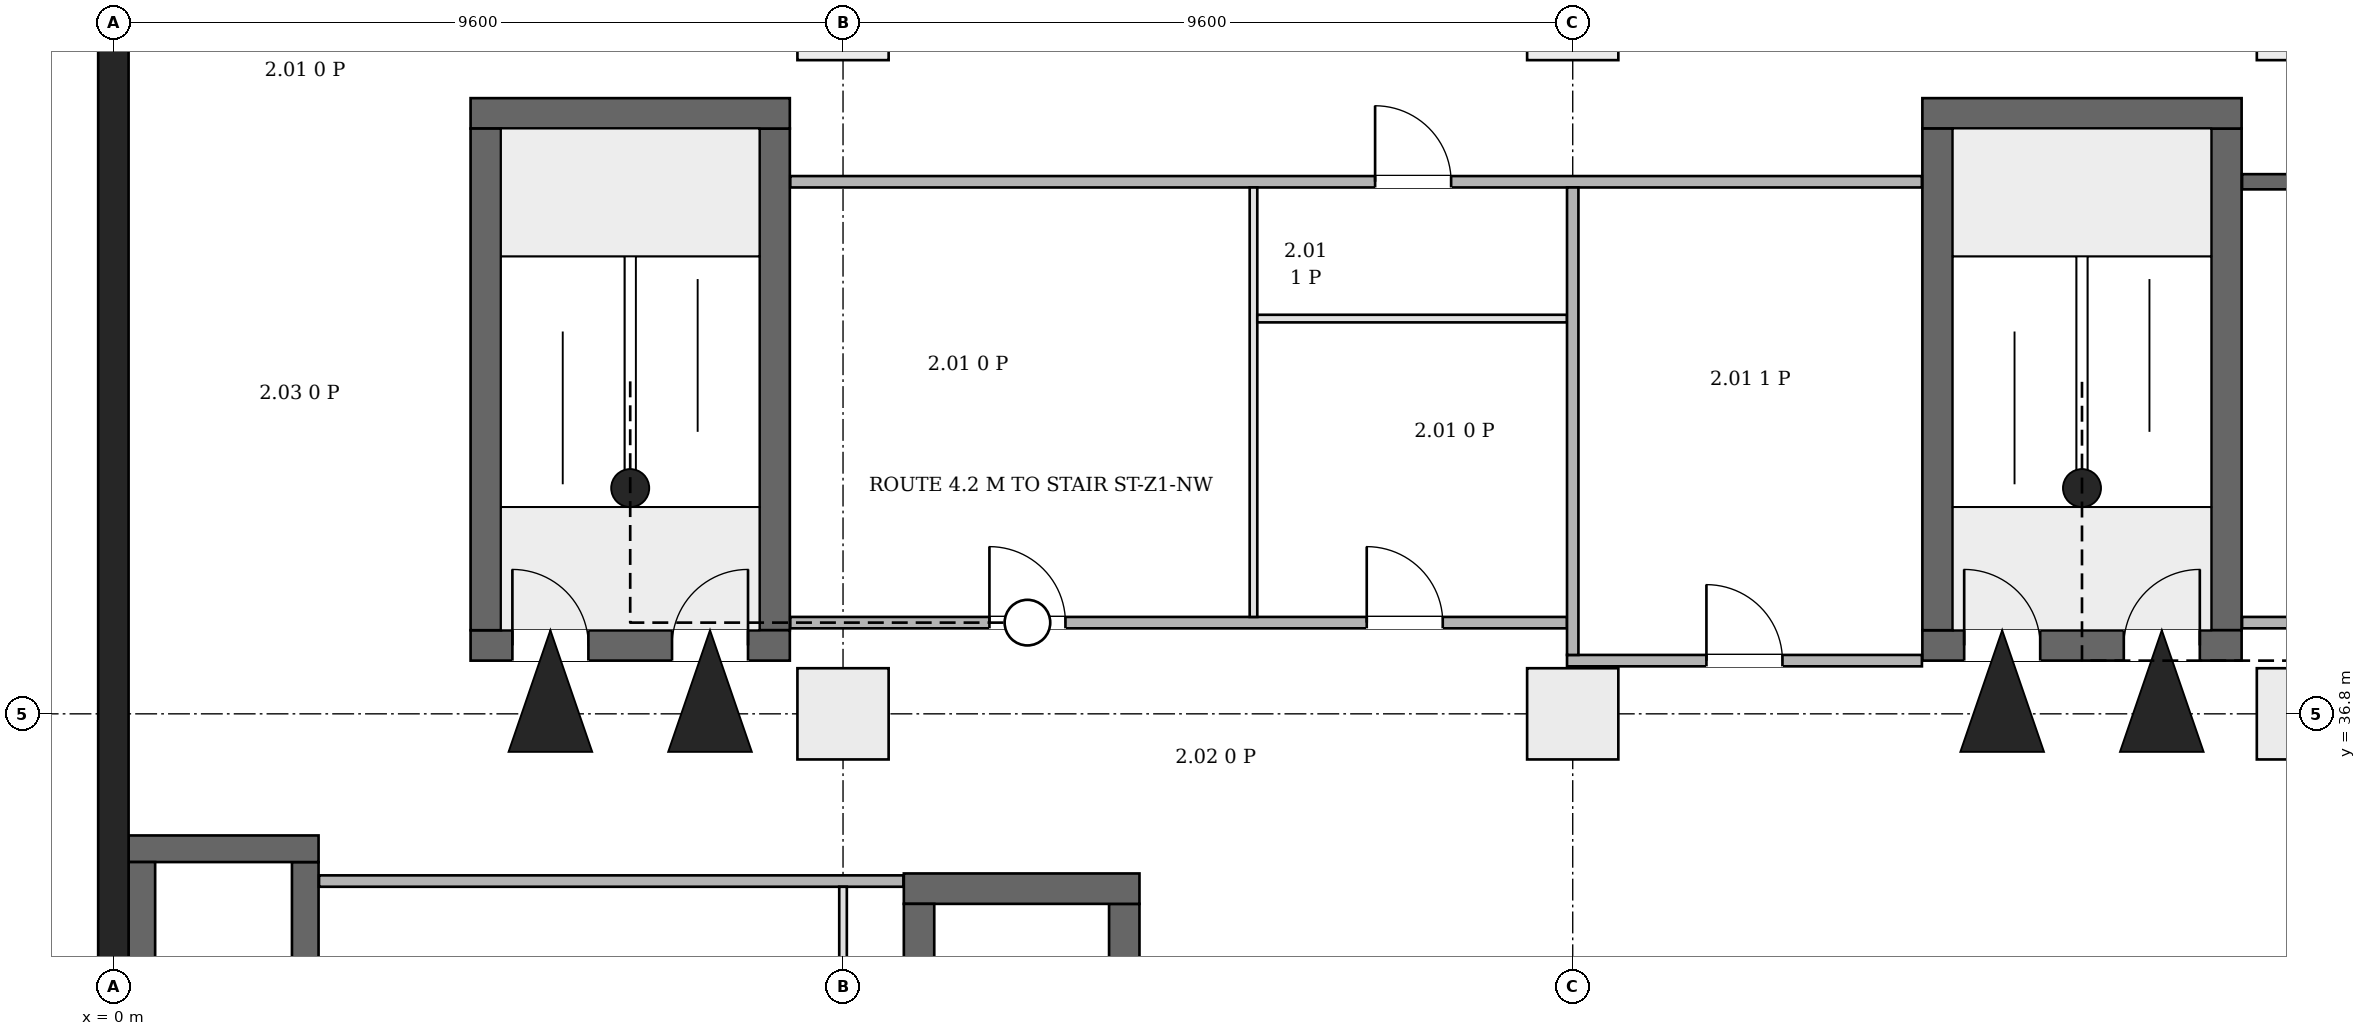
"""IFC4 building model, lengths in metres.
Left out: names, types, materials, properties, quantities, classifications, styles, units other than length and angle.
Written with IfcOpenShell. Run it as: python <this file> out.ifc"""

import sys

from ifc_helpers import new_model, si_unit, direction, frame, frame_2d, origin, origin_2d, place, context, subcontext, project, spatial, rectangle, extrude, element, fill, save


model = new_model("IFC4")
c1 = context("Model", 3, precision=1e-05, world=origin(), true_north=direction((0.0, 1.0)))
c2 = subcontext(c1, "Body", "Model", "MODEL_VIEW")
j1 = project(units=[si_unit("LENGTHUNIT", "METRE"), si_unit("PLANEANGLEUNIT", "RADIAN")], contexts=[c1])
p1 = place(None, origin())
s1 = spatial("IfcSite", under=j1, at=p1, CompositionType="ELEMENT")
p2 = place(p1, origin())
s2 = spatial("IfcBuilding", under=s1, at=p2, CompositionType="ELEMENT")
p3 = place(p2, frame((0.0, 0.0, 14.2)))
s3 = spatial("IfcBuildingStorey", under=s2, at=p3, CompositionType="ELEMENT", Elevation=14.2)
p4 = place(p3, frame((0.0, -0.2, 0.0), z_axis=(0.0, 0.0, 1.0), x_axis=(0.0, 1.0, 0.0)))
e1 = element("IfcWall", 1, at=p4, inside=s3, PredefinedType="SHEAR", context=c2, shape_type="SweptSolid", body=[
    extrude(rectangle(XDim=46.88, YDim=0.4, at=frame_2d((23.44, 0.0))), origin(), (0.0, 0.0, 1.0), 7.5),
])
p5 = place(p3, frame((4.7, 37.7, 0.0), z_axis=(0.0, 0.0, 1.0), x_axis=(1.0, 0.0, 0.0)))
e2 = element("IfcWall", 2, at=p5, inside=s3, PredefinedType="SHEAR", context=c2, shape_type="SweptSolid", body=[
    extrude(rectangle(XDim=4.2, YDim=0.4, at=frame_2d((2.1, 0.0))), origin(), (0.0, 0.0, 1.0), 7.5),
])
p6 = place(p5, frame((0.55, 0.0, 0.0)))
e3 = element("IfcOpeningElement", 3, at=p6, cuts=e2, PredefinedType="OPENING", context=c2, shape_type="SweptSolid", body=[
    extrude(rectangle(XDim=1.0, YDim=2.1, at=frame_2d((0.5, 1.05))), frame((0.0, 0.21, 0.0), z_axis=(0.0, -1.0, 0.0), x_axis=(1.0, 0.0, 0.0)), (0.0, 0.0, 1.0), 0.42),
])
p7 = place(p5, frame((2.65, 0.0, 0.0)))
e4 = element("IfcOpeningElement", 4, at=p7, cuts=e2, PredefinedType="OPENING", context=c2, shape_type="SweptSolid", body=[
    extrude(rectangle(XDim=1.0, YDim=2.1, at=frame_2d((0.5, 1.05))), frame((0.0, 0.21, 0.0), z_axis=(0.0, -1.0, 0.0), x_axis=(1.0, 0.0, 0.0)), (0.0, 0.0, 1.0), 0.42),
])
p8 = place(p3, frame((4.7, 44.7, 0.0), z_axis=(0.0, 0.0, 1.0), x_axis=(1.0, 0.0, 0.0)))
e5 = element("IfcWall", 5, at=p8, inside=s3, PredefinedType="SHEAR", context=c2, shape_type="SweptSolid", body=[
    extrude(rectangle(XDim=4.2, YDim=0.4, at=frame_2d((2.1, 0.0))), origin(), (0.0, 0.0, 1.0), 7.5),
])
for number, where, z_axis, x_axis in (
    (6, (4.9, 37.9, 0.0), (0.0, 0.0, 1.0), (0.0, 1.0, 0.0)),
    (7, (8.7, 37.9, 0.0), (0.0, 0.0, 1.0), (0.0, 1.0, 0.0)),
):
    element("IfcWall", number, at=place(p3, frame(where, z_axis=z_axis, x_axis=x_axis)), inside=s3, PredefinedType="SHEAR", context=c2, shape_type="SweptSolid", body=[
        extrude(rectangle(XDim=6.6, YDim=0.4, at=frame_2d((3.3, 0.0))), origin(), (0.0, 0.0, 1.0), 7.5),
    ])
p9 = place(p3, frame((23.8, 37.7, 0.0), z_axis=(0.0, 0.0, 1.0), x_axis=(1.0, 0.0, 0.0)))
e8 = element("IfcWall", 8, at=p9, inside=s3, PredefinedType="SHEAR", context=c2, shape_type="SweptSolid", body=[
    extrude(rectangle(XDim=4.2, YDim=0.4, at=frame_2d((2.1, 0.0))), origin(), (0.0, 0.0, 1.0), 7.5),
])
p10 = place(p9, frame((0.55, 0.0, 0.0)))
e9 = element("IfcOpeningElement", 9, at=p10, cuts=e8, PredefinedType="OPENING", context=c2, shape_type="SweptSolid", body=[
    extrude(rectangle(XDim=1.0, YDim=2.1, at=frame_2d((0.5, 1.05))), frame((0.0, 0.21, 0.0), z_axis=(0.0, -1.0, 0.0), x_axis=(1.0, 0.0, 0.0)), (0.0, 0.0, 1.0), 0.42),
])
p11 = place(p9, frame((2.65, 0.0, 0.0)))
e10 = element("IfcOpeningElement", 10, at=p11, cuts=e8, PredefinedType="OPENING", context=c2, shape_type="SweptSolid", body=[
    extrude(rectangle(XDim=1.0, YDim=2.1, at=frame_2d((0.5, 1.05))), frame((0.0, 0.21, 0.0), z_axis=(0.0, -1.0, 0.0), x_axis=(1.0, 0.0, 0.0)), (0.0, 0.0, 1.0), 0.42),
])
p12 = place(p3, frame((23.8, 44.7, 0.0), z_axis=(0.0, 0.0, 1.0), x_axis=(1.0, 0.0, 0.0)))
e11 = element("IfcWall", 11, at=p12, inside=s3, PredefinedType="SHEAR", context=c2, shape_type="SweptSolid", body=[
    extrude(rectangle(XDim=4.2, YDim=0.4, at=frame_2d((2.1, 0.0))), origin(), (0.0, 0.0, 1.0), 7.5),
])
for number, where, z_axis, x_axis in (
    (12, (24.0, 37.9, 0.0), (0.0, 0.0, 1.0), (0.0, 1.0, 0.0)),
    (13, (27.8, 37.9, 0.0), (0.0, 0.0, 1.0), (0.0, 1.0, 0.0)),
):
    element("IfcWall", number, at=place(p3, frame(where, z_axis=z_axis, x_axis=x_axis)), inside=s3, PredefinedType="SHEAR", context=c2, shape_type="SweptSolid", body=[
        extrude(rectangle(XDim=6.6, YDim=0.4, at=frame_2d((3.3, 0.0))), origin(), (0.0, 0.0, 1.0), 7.5),
    ])
p13 = place(p3, frame((0.2, 35.025, 0.0), z_axis=(0.0, 0.0, 1.0), x_axis=(1.0, 0.0, 0.0)))
e14 = element("IfcWall", 14, at=p13, inside=s3, PredefinedType="SHEAR", context=c2, shape_type="SweptSolid", body=[
    extrude(rectangle(XDim=2.5, YDim=0.35, at=frame_2d((1.25, 0.0))), origin(), (0.0, 0.0, 1.0), 7.5),
])
for number, where, z_axis, x_axis in (
    (15, (0.375, 31.35, 0.0), (0.0, 0.0, 1.0), (0.0, 1.0, 0.0)),
    (16, (2.525, 31.35, 0.0), (0.0, 0.0, 1.0), (0.0, 1.0, 0.0)),
):
    element("IfcWall", number, at=place(p3, frame(where, z_axis=z_axis, x_axis=x_axis)), inside=s3, PredefinedType="SHEAR", context=c2, shape_type="SweptSolid", body=[
        extrude(rectangle(XDim=3.5, YDim=0.35, at=frame_2d((1.75, 0.0))), origin(), (0.0, 0.0, 1.0), 7.5),
    ])
p14 = place(p3, frame((10.4, 34.5, 0.0), z_axis=(0.0, 0.0, 1.0), x_axis=(1.0, 0.0, 0.0)))
e17 = element("IfcWall", 17, at=p14, inside=s3, PredefinedType="SHEAR", context=c2, shape_type="SweptSolid", body=[
    extrude(rectangle(XDim=3.1, YDim=0.4, at=frame_2d((1.55, 0.0))), origin(), (0.0, 0.0, 1.0), 7.5),
])
for number, where, z_axis, x_axis in (
    (18, (10.6, 30.9, 0.0), (0.0, 0.0, 1.0), (0.0, 1.0, 0.0)),
    (19, (13.3, 30.9, 0.0), (0.0, 0.0, 1.0), (0.0, 1.0, 0.0)),
):
    element("IfcWall", number, at=place(p3, frame(where, z_axis=z_axis, x_axis=x_axis)), inside=s3, PredefinedType="SHEAR", context=c2, shape_type="SweptSolid", body=[
        extrude(rectangle(XDim=3.4, YDim=0.4, at=frame_2d((1.7, 0.0))), origin(), (0.0, 0.0, 1.0), 7.5),
    ])
for number, where, z_axis, x_axis in (
    (20, (9.6, 36.8, 0.0), (0.0, 0.0, 1.0), (1.0, 0.0, 0.0)),
    (21, (19.2, 36.8, 0.0), (0.0, 0.0, 1.0), (1.0, 0.0, 0.0)),
    (22, (28.8, 36.8, 0.0), (0.0, 0.0, 1.0), (1.0, 0.0, 0.0)),
    (23, (9.6, 46.0, 0.0), (0.0, 0.0, 1.0), (1.0, 0.0, 0.0)),
    (24, (19.2, 46.0, 0.0), (0.0, 0.0, 1.0), (1.0, 0.0, 0.0)),
    (25, (28.8, 46.0, 0.0), (0.0, 0.0, 1.0), (1.0, 0.0, 0.0)),
):
    element("IfcColumn", number, at=place(p3, frame(where, z_axis=z_axis, x_axis=x_axis)), inside=s3, PredefinedType="COLUMN", context=c2, shape_type="SweptSolid", body=[
        extrude(rectangle(XDim=1.2, YDim=1.2, at=origin_2d()), origin(), (0.0, 0.0, 1.0), 7.5),
    ])
p15 = place(p3, frame((2.706, 34.6, 0.0), z_axis=(0.0, 0.0, 1.0), x_axis=(1.0, 0.0, 0.0)))
e26 = element("IfcWall", 26, at=p15, inside=s3, PredefinedType="PARTITIONING", context=c2, shape_type="SweptSolid", body=[
    extrude(rectangle(XDim=7.688, YDim=0.15, at=frame_2d((3.844, 0.0))), origin(), (0.0, 0.0, 1.0), 7.15),
])
p16 = place(p3, frame((8.906, 38.0, 0.0), z_axis=(0.0, 0.0, 1.0), x_axis=(1.0, 0.0, 0.0)))
e27 = element("IfcWall", 27, at=p16, inside=s3, PredefinedType="PARTITIONING", context=c2, shape_type="SweptSolid", body=[
    extrude(rectangle(XDim=10.219, YDim=0.15, at=frame_2d((5.109, 0.0))), origin(), (0.0, 0.0, 1.0), 7.15),
])
p17 = place(p16, frame((2.62, 0.0, 0.0)))
e28 = element("IfcOpeningElement", 28, at=p17, cuts=e27, PredefinedType="OPENING", context=c2, shape_type="SweptSolid", body=[
    extrude(rectangle(XDim=1.0, YDim=2.1, at=frame_2d((0.5, 1.05))), frame((0.0, 0.085, 0.0), z_axis=(0.0, -1.0, 0.0), x_axis=(1.0, 0.0, 0.0)), (0.0, 0.0, 1.0), 0.17),
])
p18 = place(p16, frame((7.584, 0.0, 0.0)))
e29 = element("IfcOpeningElement", 29, at=p18, cuts=e27, PredefinedType="OPENING", context=c2, shape_type="SweptSolid", body=[
    extrude(rectangle(XDim=1.0, YDim=2.1, at=frame_2d((0.5, 1.05))), frame((0.0, 0.085, 0.0), z_axis=(0.0, -1.0, 0.0), x_axis=(1.0, 0.0, 0.0)), (0.0, 0.0, 1.0), 0.17),
])
p19 = place(p3, frame((8.906, 43.8, 0.0), z_axis=(0.0, 0.0, 1.0), x_axis=(1.0, 0.0, 0.0)))
e30 = element("IfcWall", 30, at=p19, inside=s3, PredefinedType="PARTITIONING", context=c2, shape_type="SweptSolid", body=[
    extrude(rectangle(XDim=14.888, YDim=0.15, at=frame_2d((7.444, 0.0))), origin(), (0.0, 0.0, 1.0), 7.15),
])
p20 = place(p19, frame((7.694, 0.0, 0.0)))
e31 = element("IfcOpeningElement", 31, at=p20, cuts=e30, PredefinedType="OPENING", context=c2, shape_type="SweptSolid", body=[
    extrude(rectangle(XDim=1.0, YDim=2.1, at=frame_2d((0.5, 1.05))), frame((0.0, 0.085, 0.0), z_axis=(0.0, -1.0, 0.0), x_axis=(1.0, 0.0, 0.0)), (0.0, 0.0, 1.0), 0.17),
])
p21 = place(p3, frame((9.6, 31.075, 0.0), z_axis=(0.0, 0.0, 1.0), x_axis=(0.0, 1.0, 0.0)))
e32 = element("IfcWall", 32, at=p21, inside=s3, PredefinedType="PARTITIONING", context=c2, shape_type="SweptSolid", body=[
    extrude(rectangle(XDim=3.45, YDim=0.1, at=frame_2d((1.725, 0.0))), origin(), (0.0, 0.0, 1.0), 6.75),
])
p22 = place(p3, frame((15.0, 38.075, 0.0), z_axis=(0.0, 0.0, 1.0), x_axis=(0.0, 1.0, 0.0)))
e33 = element("IfcWall", 33, at=p22, inside=s3, PredefinedType="PARTITIONING", context=c2, shape_type="SweptSolid", body=[
    extrude(rectangle(XDim=5.65, YDim=0.1, at=frame_2d((2.825, 0.0))), origin(), (0.0, 0.0, 1.0), 7.15),
])
p23 = place(p3, frame((15.05, 42.0, 0.0), z_axis=(0.0, 0.0, 1.0), x_axis=(1.0, 0.0, 0.0)))
e34 = element("IfcWall", 34, at=p23, inside=s3, PredefinedType="PARTITIONING", context=c2, shape_type="SweptSolid", body=[
    extrude(rectangle(XDim=4.075, YDim=0.1, at=frame_2d((2.038, 0.0))), origin(), (0.0, 0.0, 1.0), 7.15),
])
p24 = place(p3, frame((19.125, 37.5, 0.0), z_axis=(0.0, 0.0, 1.0), x_axis=(1.0, 0.0, 0.0)))
e35 = element("IfcWall", 35, at=p24, inside=s3, PredefinedType="PARTITIONING", context=c2, shape_type="SweptSolid", body=[
    extrude(rectangle(XDim=4.669, YDim=0.15, at=frame_2d((2.334, 0.0))), origin(), (0.0, 0.0, 1.0), 7.15),
])
p25 = place(p24, frame((1.834, 0.0, 0.0)))
e36 = element("IfcOpeningElement", 36, at=p25, cuts=e35, PredefinedType="OPENING", context=c2, shape_type="SweptSolid", body=[
    extrude(rectangle(XDim=1.0, YDim=2.1, at=frame_2d((0.5, 1.05))), frame((0.0, 0.085, 0.0), z_axis=(0.0, -1.0, 0.0), x_axis=(1.0, 0.0, 0.0)), (0.0, 0.0, 1.0), 0.17),
])
p26 = place(p3, frame((19.2, 37.575, 0.0), z_axis=(0.0, 0.0, 1.0), x_axis=(0.0, 1.0, 0.0)))
e37 = element("IfcWall", 37, at=p26, inside=s3, PredefinedType="PARTITIONING", context=c2, shape_type="SweptSolid", body=[
    extrude(rectangle(XDim=6.15, YDim=0.15, at=frame_2d((3.075, 0.0))), origin(), (0.0, 0.0, 1.0), 6.75),
])
p27 = place(p3, frame((28.006, 38.0, 0.0), z_axis=(0.0, 0.0, 1.0), x_axis=(1.0, 0.0, 0.0)))
e38 = element("IfcWall", 38, at=p27, inside=s3, PredefinedType="PARTITIONING", context=c2, shape_type="SweptSolid", body=[
    extrude(rectangle(XDim=1.894, YDim=0.15, at=frame_2d((0.947, 0.0))), origin(), (0.0, 0.0, 1.0), 7.15),
])
p28 = place(p3, frame((28.006, 43.8, 0.0), z_axis=(0.0, 0.0, 1.0), x_axis=(1.0, 0.0, 0.0)))
e39 = element("IfcWall", 39, at=p28, inside=s3, PredefinedType="PARTITIONING", context=c2, shape_type="SweptSolid", body=[
    extrude(rectangle(XDim=29.388, YDim=0.2, at=frame_2d((14.694, 0.0))), origin(), (0.0, 0.0, 1.0), 7.15),
])
p29 = place(p6, origin())
e40 = element("IfcDoor", 40, at=p29, inside=s3, OperationType="SINGLE_SWING_RIGHT", PredefinedType="DOOR", context=c2, shape_type="SweptSolid", body=[
    extrude(rectangle(XDim=1.0, YDim=2.1, at=frame_2d((0.5, 1.05))), frame((0.0, 0.025, 0.0), z_axis=(0.0, -1.0, 0.0), x_axis=(1.0, 0.0, 0.0)), (0.0, 0.0, 1.0), 0.05),
])
fill(e3, e40)
p30 = place(p7, origin())
e41 = element("IfcDoor", 41, at=p30, inside=s3, OperationType="SINGLE_SWING_LEFT", PredefinedType="DOOR", context=c2, shape_type="SweptSolid", body=[
    extrude(rectangle(XDim=1.0, YDim=2.1, at=frame_2d((0.5, 1.05))), frame((0.0, 0.025, 0.0), z_axis=(0.0, -1.0, 0.0), x_axis=(1.0, 0.0, 0.0)), (0.0, 0.0, 1.0), 0.05),
])
fill(e4, e41)
p31 = place(p10, origin())
e42 = element("IfcDoor", 42, at=p31, inside=s3, OperationType="SINGLE_SWING_RIGHT", PredefinedType="DOOR", context=c2, shape_type="SweptSolid", body=[
    extrude(rectangle(XDim=1.0, YDim=2.1, at=frame_2d((0.5, 1.05))), frame((0.0, 0.025, 0.0), z_axis=(0.0, -1.0, 0.0), x_axis=(1.0, 0.0, 0.0)), (0.0, 0.0, 1.0), 0.05),
])
fill(e9, e42)
p32 = place(p11, origin())
e43 = element("IfcDoor", 43, at=p32, inside=s3, OperationType="SINGLE_SWING_LEFT", PredefinedType="DOOR", context=c2, shape_type="SweptSolid", body=[
    extrude(rectangle(XDim=1.0, YDim=2.1, at=frame_2d((0.5, 1.05))), frame((0.0, 0.025, 0.0), z_axis=(0.0, -1.0, 0.0), x_axis=(1.0, 0.0, 0.0)), (0.0, 0.0, 1.0), 0.05),
])
fill(e10, e43)
p33 = place(p25, origin())
e44 = element("IfcDoor", 44, at=p33, inside=s3, OperationType="SINGLE_SWING_LEFT", PredefinedType="DOOR", context=c2, shape_type="SweptSolid", body=[
    extrude(rectangle(XDim=1.0, YDim=2.1, at=frame_2d((0.5, 1.05))), frame((0.0, 0.025, 0.0), z_axis=(0.0, -1.0, 0.0), x_axis=(1.0, 0.0, 0.0)), (0.0, 0.0, 1.0), 0.05),
])
fill(e36, e44)
p34 = place(p17, origin())
e45 = element("IfcDoor", 45, at=p34, inside=s3, OperationType="SINGLE_SWING_LEFT", PredefinedType="DOOR", context=c2, shape_type="SweptSolid", body=[
    extrude(rectangle(XDim=1.0, YDim=2.1, at=frame_2d((0.5, 1.05))), frame((0.0, 0.025, 0.0), z_axis=(0.0, -1.0, 0.0), x_axis=(1.0, 0.0, 0.0)), (0.0, 0.0, 1.0), 0.05),
])
fill(e28, e45)
p35 = place(p18, origin())
e46 = element("IfcDoor", 46, at=p35, inside=s3, OperationType="SINGLE_SWING_RIGHT", PredefinedType="DOOR", context=c2, shape_type="SweptSolid", body=[
    extrude(rectangle(XDim=1.0, YDim=2.1, at=frame_2d((0.5, 1.05))), frame((0.0, 0.025, 0.0), z_axis=(0.0, -1.0, 0.0), x_axis=(1.0, 0.0, 0.0)), (0.0, 0.0, 1.0), 0.05),
])
fill(e29, e46)
p36 = place(p20, origin())
e47 = element("IfcDoor", 47, at=p36, inside=s3, OperationType="SINGLE_SWING_LEFT", PredefinedType="DOOR", context=c2, shape_type="SweptSolid", body=[
    extrude(rectangle(XDim=1.0, YDim=2.1, at=frame_2d((0.5, 1.05))), frame((0.0, 0.025, 0.0), z_axis=(0.0, -1.0, 0.0), x_axis=(1.0, 0.0, 0.0)), (0.0, 0.0, 1.0), 0.05),
])
fill(e31, e47)
save(model, sys.argv[1])
